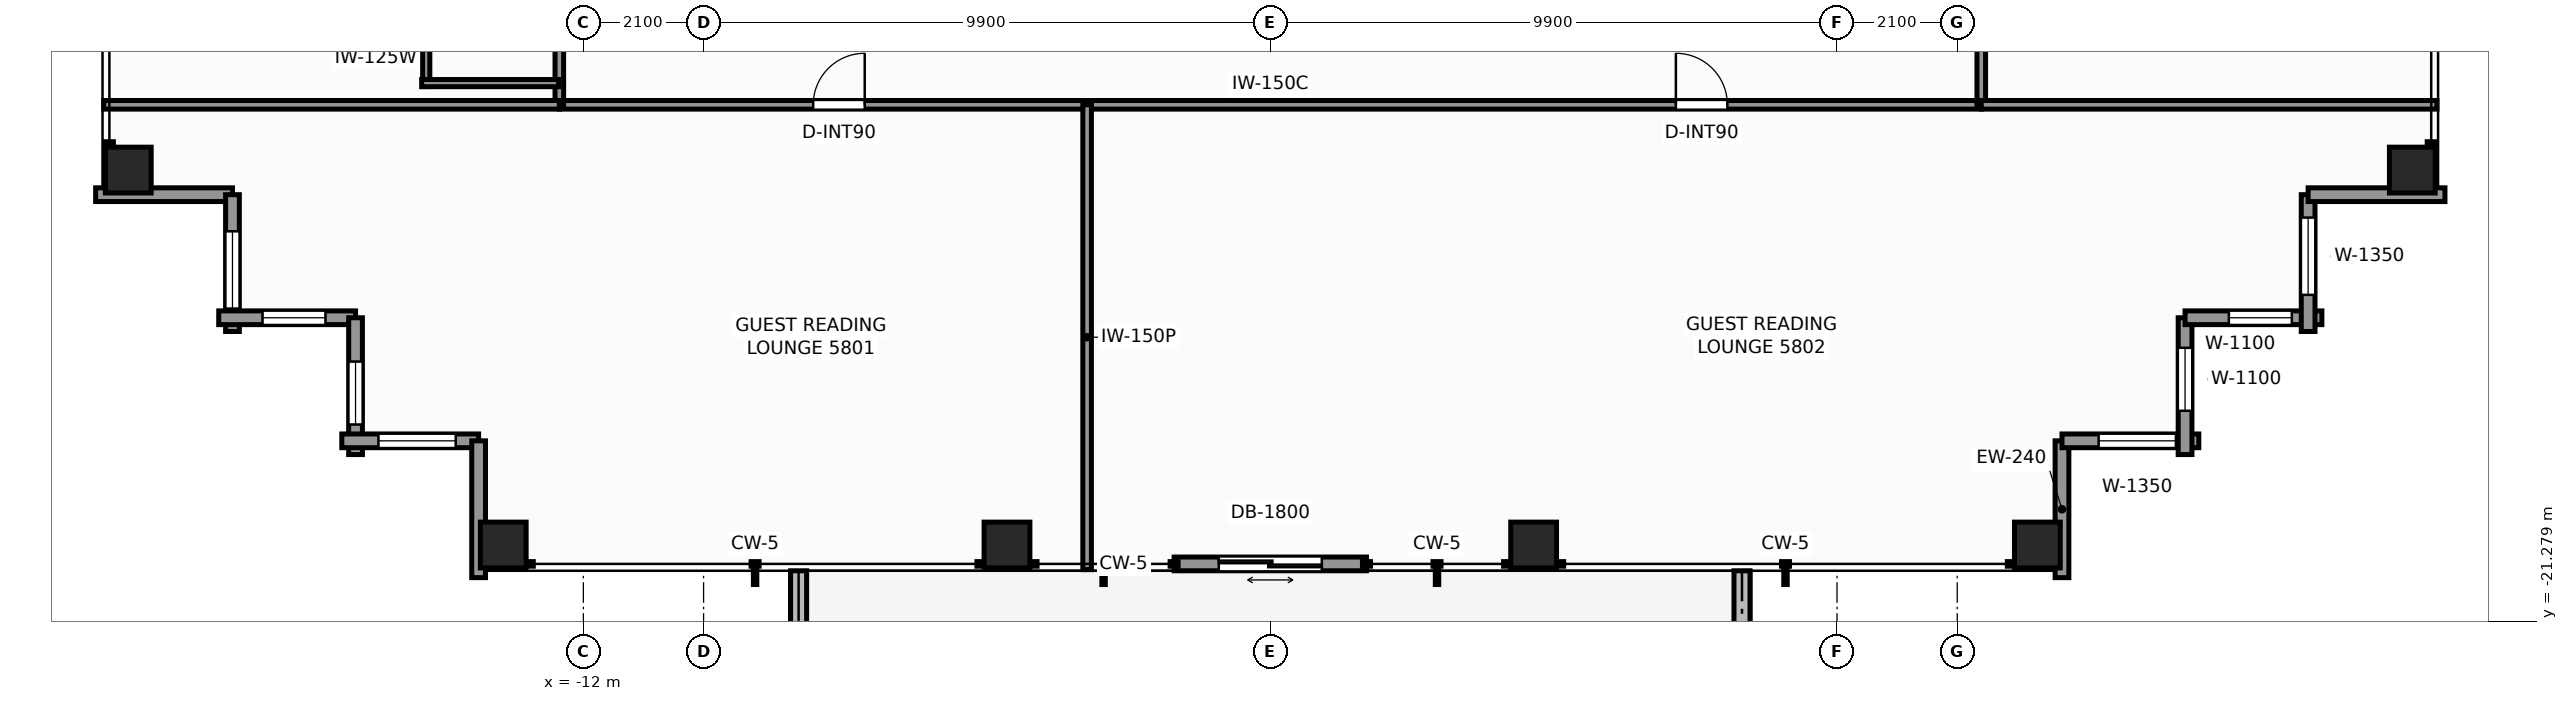
"""IFC4 building model, lengths in metres.
Left out: names, types, materials, properties, quantities, classifications, styles, units other than length and angle.
Written with IfcOpenShell. Run it as: python <this file> out.ifc"""

import sys

from ifc_helpers import new_model, si_unit, direction, frame, frame_2d, origin, origin_2d, place, context, subcontext, project, spatial, rectangle, extrude, element, fill, save


model = new_model("IFC4")
c1 = context("Model", 3, precision=1e-05, world=origin(), true_north=direction((0.0, 1.0)))
c2 = subcontext(c1, "Body", "Model", "MODEL_VIEW")
j1 = project(units=[si_unit("LENGTHUNIT", "METRE"), si_unit("PLANEANGLEUNIT", "RADIAN")], contexts=[c1])
p1 = place(None, origin())
s1 = spatial("IfcSite", under=j1, at=p1, CompositionType="ELEMENT")
p2 = place(p1, origin())
s2 = spatial("IfcBuilding", under=s1, at=p2, CompositionType="ELEMENT")
p3 = place(p2, frame((0.0, 0.0, 199.8)))
s3 = spatial("IfcBuildingStorey", under=s2, at=p3, CompositionType="ELEMENT", Elevation=199.8)
for number, where, z_axis, x_axis in (
    (1, (-13.4, -19.95, 0.0), (0.0, 0.0, 1.0), (1.0, 0.0, 0.0)),
    (2, (-4.6, -19.95, 0.0), (0.0, 0.0, 1.0), (1.0, 0.0, 0.0)),
    (3, (4.6, -19.95, 0.0), (0.0, 0.0, 1.0), (1.0, 0.0, 0.0)),
    (4, (13.4, -19.95, 0.0), (0.0, 0.0, 1.0), (1.0, 0.0, 0.0)),
    (5, (-19.95, -13.4, 0.0), (0.0, 0.0, 1.0), (1.0, 0.0, 0.0)),
    (6, (19.95, -13.4, 0.0), (0.0, 0.0, 1.0), (1.0, 0.0, 0.0)),
):
    element("IfcColumn", number, at=place(p3, frame(where, z_axis=z_axis, x_axis=x_axis)), inside=s3, PredefinedType="COLUMN", context=c2, shape_type="SweptSolid", body=[
        extrude(rectangle(XDim=0.8, YDim=0.8, at=origin_2d()), origin(), (0.0, 0.0, 1.0), 3.3),
    ])
p4 = place(p3, frame((8.24, -23.82, -0.04), z_axis=(0.0, 0.0, 1.0), x_axis=(0.0, 1.0, 0.0)))
e7 = element("IfcWall", 7, at=p4, inside=s3, PredefinedType="PARAPET", context=c2, shape_type="SweptSolid", body=[
    extrude(rectangle(XDim=3.42, YDim=0.28, at=frame_2d((1.71, 0.0))), origin(), (0.0, 0.0, 1.0), 0.42),
])
p5 = place(p3, frame((-8.24, -20.4, -0.04), z_axis=(0.0, 0.0, 1.0), x_axis=(0.0, -1.0, 0.0)))
e8 = element("IfcWall", 8, at=p5, inside=s3, PredefinedType="PARAPET", context=c2, shape_type="SweptSolid", body=[
    extrude(rectangle(XDim=2.674, YDim=0.28, at=frame_2d((1.337, 0.0))), origin(), (0.0, 0.0, 1.0), 0.42),
])
p6 = place(p3, frame((1.68, -20.28, 0.0), z_axis=(0.0, 0.0, 1.0), x_axis=(-1.0, 0.0, 0.0)))
e9 = element("IfcWall", 9, at=p6, inside=s3, PredefinedType="STANDARD", context=c2, shape_type="SweptSolid", body=[
    extrude(rectangle(XDim=3.36, YDim=0.24, at=frame_2d((1.68, 0.0))), origin(), (0.0, 0.0, 1.0), 3.08),
])
p7 = place(p6, frame((0.78, 0.0, 0.0)))
e10 = element("IfcOpeningElement", 10, at=p7, cuts=e9, PredefinedType="OPENING", context=c2, shape_type="SweptSolid", body=[
    extrude(rectangle(XDim=1.8, YDim=2.2, at=frame_2d((0.9, 1.1))), frame((0.0, 0.13, 0.0), z_axis=(0.0, -1.0, 0.0), x_axis=(1.0, 0.0, 0.0)), (0.0, 0.0, 1.0), 0.26),
])
p8 = place(p3, frame((13.83, -18.13, 0.0), z_axis=(0.0, 0.0, 1.0), x_axis=(0.0, -1.0, 0.0)))
e11 = element("IfcWall", 11, at=p8, inside=s3, PredefinedType="STANDARD", context=c2, shape_type="SweptSolid", body=[
    extrude(rectangle(XDim=2.39, YDim=0.24, at=frame_2d((1.195, 0.0))), origin(), (0.0, 0.0, 1.0), 2.463),
])
p9 = place(p3, frame((16.22, -18.13, 0.0), z_axis=(0.0, 0.0, 1.0), x_axis=(-1.0, 0.0, 0.0)))
e12 = element("IfcWall", 12, at=p9, inside=s3, PredefinedType="STANDARD", context=c2, shape_type="SweptSolid", body=[
    extrude(rectangle(XDim=2.39, YDim=0.24, at=frame_2d((1.195, 0.0))), origin(), (0.0, 0.0, 1.0), 2.463),
])
p10 = place(p9, frame((0.4, 0.0, 0.65)))
e13 = element("IfcOpeningElement", 13, at=p10, cuts=e12, PredefinedType="OPENING", context=c2, shape_type="SweptSolid", body=[
    extrude(rectangle(XDim=1.35, YDim=1.55, at=frame_2d((0.675, 0.775))), frame((0.0, 0.13, 0.0), z_axis=(0.0, -1.0, 0.0), x_axis=(1.0, 0.0, 0.0)), (0.0, 0.0, 1.0), 0.26),
])
p11 = place(p3, frame((15.98, -15.98, 0.0), z_axis=(0.0, 0.0, 1.0), x_axis=(0.0, -1.0, 0.0)))
e14 = element("IfcWall", 14, at=p11, inside=s3, PredefinedType="STANDARD", context=c2, shape_type="SweptSolid", body=[
    extrude(rectangle(XDim=2.39, YDim=0.24, at=frame_2d((1.195, 0.0))), origin(), (0.0, 0.0, 1.0), 2.463),
])
p12 = place(p11, frame((0.525, 0.0, 0.65)))
e15 = element("IfcOpeningElement", 15, at=p12, cuts=e14, PredefinedType="OPENING", context=c2, shape_type="SweptSolid", body=[
    extrude(rectangle(XDim=1.1, YDim=1.45, at=frame_2d((0.55, 0.725))), frame((0.0, 0.13, 0.0), z_axis=(0.0, -1.0, 0.0), x_axis=(1.0, 0.0, 0.0)), (0.0, 0.0, 1.0), 0.26),
])
p13 = place(p3, frame((18.37, -15.98, 0.0), z_axis=(0.0, 0.0, 1.0), x_axis=(-1.0, 0.0, 0.0)))
e16 = element("IfcWall", 16, at=p13, inside=s3, PredefinedType="STANDARD", context=c2, shape_type="SweptSolid", body=[
    extrude(rectangle(XDim=2.39, YDim=0.24, at=frame_2d((1.195, 0.0))), origin(), (0.0, 0.0, 1.0), 2.463),
])
p14 = place(p13, frame((0.525, 0.0, 0.65)))
e17 = element("IfcOpeningElement", 17, at=p14, cuts=e16, PredefinedType="OPENING", context=c2, shape_type="SweptSolid", body=[
    extrude(rectangle(XDim=1.1, YDim=1.45, at=frame_2d((0.55, 0.725))), frame((0.0, 0.13, 0.0), z_axis=(0.0, -1.0, 0.0), x_axis=(1.0, 0.0, 0.0)), (0.0, 0.0, 1.0), 0.26),
])
p15 = place(p3, frame((18.13, -13.83, 0.0), z_axis=(0.0, 0.0, 1.0), x_axis=(0.0, -1.0, 0.0)))
e18 = element("IfcWall", 18, at=p15, inside=s3, PredefinedType="STANDARD", context=c2, shape_type="SweptSolid", body=[
    extrude(rectangle(XDim=2.39, YDim=0.24, at=frame_2d((1.195, 0.0))), origin(), (0.0, 0.0, 1.0), 2.463),
])
p16 = place(p15, frame((0.4, 0.0, 0.65)))
e19 = element("IfcOpeningElement", 19, at=p16, cuts=e18, PredefinedType="OPENING", context=c2, shape_type="SweptSolid", body=[
    extrude(rectangle(XDim=1.35, YDim=1.55, at=frame_2d((0.675, 0.775))), frame((0.0, 0.13, 0.0), z_axis=(0.0, -1.0, 0.0), x_axis=(1.0, 0.0, 0.0)), (0.0, 0.0, 1.0), 0.26),
])
for number, where, z_axis, x_axis in (
    (20, (20.52, -13.83, 0.0), (0.0, 0.0, 1.0), (-1.0, 0.0, 0.0)),
    (21, (-18.13, -13.83, 0.0), (0.0, 0.0, 1.0), (-1.0, 0.0, 0.0)),
):
    element("IfcWall", number, at=place(p3, frame(where, z_axis=z_axis, x_axis=x_axis)), inside=s3, PredefinedType="STANDARD", context=c2, shape_type="SweptSolid", body=[
        extrude(rectangle(XDim=2.39, YDim=0.24, at=frame_2d((1.195, 0.0))), origin(), (0.0, 0.0, 1.0), 2.463),
    ])
p17 = place(p3, frame((-18.13, -16.22, 0.0), z_axis=(0.0, 0.0, 1.0), x_axis=(0.0, 1.0, 0.0)))
e22 = element("IfcWall", 22, at=p17, inside=s3, PredefinedType="STANDARD", context=c2, shape_type="SweptSolid", body=[
    extrude(rectangle(XDim=2.39, YDim=0.24, at=frame_2d((1.195, 0.0))), origin(), (0.0, 0.0, 1.0), 2.463),
])
p18 = place(p17, frame((0.4, 0.0, 0.65)))
e23 = element("IfcOpeningElement", 23, at=p18, cuts=e22, PredefinedType="OPENING", context=c2, shape_type="SweptSolid", body=[
    extrude(rectangle(XDim=1.35, YDim=1.55, at=frame_2d((0.675, 0.775))), frame((0.0, 0.13, 0.0), z_axis=(0.0, -1.0, 0.0), x_axis=(1.0, 0.0, 0.0)), (0.0, 0.0, 1.0), 0.26),
])
p19 = place(p3, frame((-15.98, -15.98, 0.0), z_axis=(0.0, 0.0, 1.0), x_axis=(-1.0, 0.0, 0.0)))
e24 = element("IfcWall", 24, at=p19, inside=s3, PredefinedType="STANDARD", context=c2, shape_type="SweptSolid", body=[
    extrude(rectangle(XDim=2.39, YDim=0.24, at=frame_2d((1.195, 0.0))), origin(), (0.0, 0.0, 1.0), 2.463),
])
p20 = place(p19, frame((0.525, 0.0, 0.65)))
e25 = element("IfcOpeningElement", 25, at=p20, cuts=e24, PredefinedType="OPENING", context=c2, shape_type="SweptSolid", body=[
    extrude(rectangle(XDim=1.1, YDim=1.45, at=frame_2d((0.55, 0.725))), frame((0.0, 0.13, 0.0), z_axis=(0.0, -1.0, 0.0), x_axis=(1.0, 0.0, 0.0)), (0.0, 0.0, 1.0), 0.26),
])
p21 = place(p3, frame((-15.98, -18.37, 0.0), z_axis=(0.0, 0.0, 1.0), x_axis=(0.0, 1.0, 0.0)))
e26 = element("IfcWall", 26, at=p21, inside=s3, PredefinedType="STANDARD", context=c2, shape_type="SweptSolid", body=[
    extrude(rectangle(XDim=2.39, YDim=0.24, at=frame_2d((1.195, 0.0))), origin(), (0.0, 0.0, 1.0), 2.463),
])
p22 = place(p21, frame((0.525, 0.0, 0.65)))
e27 = element("IfcOpeningElement", 27, at=p22, cuts=e26, PredefinedType="OPENING", context=c2, shape_type="SweptSolid", body=[
    extrude(rectangle(XDim=1.1, YDim=1.45, at=frame_2d((0.55, 0.725))), frame((0.0, 0.13, 0.0), z_axis=(0.0, -1.0, 0.0), x_axis=(1.0, 0.0, 0.0)), (0.0, 0.0, 1.0), 0.26),
])
p23 = place(p3, frame((-13.83, -18.13, 0.0), z_axis=(0.0, 0.0, 1.0), x_axis=(-1.0, 0.0, 0.0)))
e28 = element("IfcWall", 28, at=p23, inside=s3, PredefinedType="STANDARD", context=c2, shape_type="SweptSolid", body=[
    extrude(rectangle(XDim=2.39, YDim=0.24, at=frame_2d((1.195, 0.0))), origin(), (0.0, 0.0, 1.0), 2.463),
])
p24 = place(p23, frame((0.4, 0.0, 0.65)))
e29 = element("IfcOpeningElement", 29, at=p24, cuts=e28, PredefinedType="OPENING", context=c2, shape_type="SweptSolid", body=[
    extrude(rectangle(XDim=1.35, YDim=1.55, at=frame_2d((0.675, 0.775))), frame((0.0, 0.13, 0.0), z_axis=(0.0, -1.0, 0.0), x_axis=(1.0, 0.0, 0.0)), (0.0, 0.0, 1.0), 0.26),
])
p25 = place(p3, frame((-13.83, -20.52, 0.0), z_axis=(0.0, 0.0, 1.0), x_axis=(0.0, 1.0, 0.0)))
e30 = element("IfcWall", 30, at=p25, inside=s3, PredefinedType="STANDARD", context=c2, shape_type="SweptSolid", body=[
    extrude(rectangle(XDim=2.39, YDim=0.24, at=frame_2d((1.195, 0.0))), origin(), (0.0, 0.0, 1.0), 2.463),
])
p26 = place(p3, frame((-12.42, -12.26, 0.0), z_axis=(0.0, 0.0, 1.0), x_axis=(1.0, 0.0, 0.0)))
e31 = element("IfcWall", 31, at=p26, inside=s3, PredefinedType="PARTITIONING", context=c2, shape_type="SweptSolid", body=[
    extrude(rectangle(XDim=24.84, YDim=0.15, at=frame_2d((12.42, 0.0))), origin(), (0.0, 0.0, 1.0), 2.369),
])
p27 = place(p26, frame((4.435, 0.0, 0.0)))
e32 = element("IfcOpeningElement", 32, at=p27, cuts=e31, PredefinedType="OPENING", context=c2, shape_type="SweptSolid", body=[
    extrude(rectangle(XDim=0.9, YDim=2.06, at=frame_2d((0.45, 1.03))), frame((0.0, 0.085, 0.0), z_axis=(0.0, -1.0, 0.0), x_axis=(1.0, 0.0, 0.0)), (0.0, 0.0, 1.0), 0.17),
])
p28 = place(p26, frame((19.505, 0.0, 0.0)))
e33 = element("IfcOpeningElement", 33, at=p28, cuts=e31, PredefinedType="OPENING", context=c2, shape_type="SweptSolid", body=[
    extrude(rectangle(XDim=0.9, YDim=2.06, at=frame_2d((0.45, 1.03))), frame((0.0, 0.085, 0.0), z_axis=(0.0, -1.0, 0.0), x_axis=(1.0, 0.0, 0.0)), (0.0, 0.0, 1.0), 0.17),
])
p29 = place(p3, frame((-12.42, -12.26, 0.0), z_axis=(0.0, 0.0, 1.0), x_axis=(0.0, 1.0, 0.0)))
e34 = element("IfcWall", 34, at=p29, inside=s3, PredefinedType="PARTITIONING", context=c2, shape_type="SweptSolid", body=[
    extrude(rectangle(XDim=24.84, YDim=0.15, at=frame_2d((12.42, 0.0))), origin(), (0.0, 0.0, 1.0), 2.369),
])
p30 = place(p29, frame((3.573, 0.0, 0.0)))
e35 = element("IfcOpeningElement", 35, at=p30, cuts=e34, PredefinedType="OPENING", context=c2, shape_type="SweptSolid", body=[
    extrude(rectangle(XDim=0.95, YDim=2.06, at=frame_2d((0.475, 1.03))), frame((0.0, 0.085, 0.0), z_axis=(0.0, -1.0, 0.0), x_axis=(1.0, 0.0, 0.0)), (0.0, 0.0, 1.0), 0.17),
])
p31 = place(p29, frame((9.755, 0.0, 0.0)))
e36 = element("IfcOpeningElement", 36, at=p31, cuts=e34, PredefinedType="OPENING", context=c2, shape_type="SweptSolid", body=[
    extrude(rectangle(XDim=0.95, YDim=2.06, at=frame_2d((0.475, 1.03))), frame((0.0, 0.085, 0.0), z_axis=(0.0, -1.0, 0.0), x_axis=(1.0, 0.0, 0.0)), (0.0, 0.0, 1.0), 0.17),
])
p32 = place(p29, frame((19.32, 0.0, 0.0)))
e37 = element("IfcOpeningElement", 37, at=p32, cuts=e34, PredefinedType="OPENING", context=c2, shape_type="SweptSolid", body=[
    extrude(rectangle(XDim=0.95, YDim=2.06, at=frame_2d((0.475, 1.03))), frame((0.0, 0.085, 0.0), z_axis=(0.0, -1.0, 0.0), x_axis=(1.0, 0.0, 0.0)), (0.0, 0.0, 1.0), 0.17),
])
p33 = place(p3, frame((12.42, -12.26, 0.0), z_axis=(0.0, 0.0, 1.0), x_axis=(0.0, 1.0, 0.0)))
e38 = element("IfcWall", 38, at=p33, inside=s3, PredefinedType="PARTITIONING", context=c2, shape_type="SweptSolid", body=[
    extrude(rectangle(XDim=24.84, YDim=0.15, at=frame_2d((12.42, 0.0))), origin(), (0.0, 0.0, 1.0), 2.369),
])
p34 = place(p33, frame((2.944, 0.0, 0.0)))
e39 = element("IfcOpeningElement", 39, at=p34, cuts=e38, PredefinedType="OPENING", context=c2, shape_type="SweptSolid", body=[
    extrude(rectangle(XDim=0.9, YDim=2.06, at=frame_2d((0.45, 1.03))), frame((0.0, 0.085, 0.0), z_axis=(0.0, -1.0, 0.0), x_axis=(1.0, 0.0, 0.0)), (0.0, 0.0, 1.0), 0.17),
])
p35 = place(p33, frame((5.279, 0.0, 0.0)))
e40 = element("IfcOpeningElement", 40, at=p35, cuts=e38, PredefinedType="OPENING", context=c2, shape_type="SweptSolid", body=[
    extrude(rectangle(XDim=0.9, YDim=2.06, at=frame_2d((0.45, 1.03))), frame((0.0, 0.085, 0.0), z_axis=(0.0, -1.0, 0.0), x_axis=(1.0, 0.0, 0.0)), (0.0, 0.0, 1.0), 0.17),
])
p36 = place(p33, frame((13.602, 0.0, 0.0)))
e41 = element("IfcOpeningElement", 41, at=p36, cuts=e38, PredefinedType="OPENING", context=c2, shape_type="SweptSolid", body=[
    extrude(rectangle(XDim=0.9, YDim=2.06, at=frame_2d((0.45, 1.03))), frame((0.0, 0.085, 0.0), z_axis=(0.0, -1.0, 0.0), x_axis=(1.0, 0.0, 0.0)), (0.0, 0.0, 1.0), 0.17),
])
p37 = place(p33, frame((19.098, 0.0, 0.0)))
e42 = element("IfcOpeningElement", 42, at=p37, cuts=e38, PredefinedType="OPENING", context=c2, shape_type="SweptSolid", body=[
    extrude(rectangle(XDim=0.95, YDim=2.06, at=frame_2d((0.475, 1.03))), frame((0.0, 0.085, 0.0), z_axis=(0.0, -1.0, 0.0), x_axis=(1.0, 0.0, 0.0)), (0.0, 0.0, 1.0), 0.17),
])
p38 = place(p33, frame((20.836, 0.0, 0.0)))
e43 = element("IfcOpeningElement", 43, at=p38, cuts=e38, PredefinedType="OPENING", context=c2, shape_type="SweptSolid", body=[
    extrude(rectangle(XDim=0.9, YDim=2.06, at=frame_2d((0.45, 1.03))), frame((0.0, 0.085, 0.0), z_axis=(0.0, -1.0, 0.0), x_axis=(1.0, 0.0, 0.0)), (0.0, 0.0, 1.0), 0.17),
])
for number, where, z_axis, x_axis in (
    (44, (-20.38, -12.26, 0.0), (0.0, 0.0, 1.0), (1.0, 0.0, 0.0)),
    (45, (12.42, -12.26, 0.0), (0.0, 0.0, 1.0), (1.0, 0.0, 0.0)),
):
    element("IfcWall", number, at=place(p3, frame(where, z_axis=z_axis, x_axis=x_axis)), inside=s3, PredefinedType="PARTITIONING", context=c2, shape_type="SweptSolid", body=[
        extrude(rectangle(XDim=7.96, YDim=0.15, at=frame_2d((3.98, 0.0))), origin(), (0.0, 0.0, 1.0), 2.369),
    ])
p39 = place(p3, frame((-3.2, -20.38, 0.0), z_axis=(0.0, 0.0, 1.0), x_axis=(0.0, 1.0, 0.0)))
e46 = element("IfcWall", 46, at=p39, inside=s3, PredefinedType="PARTITIONING", context=c2, shape_type="SweptSolid", body=[
    extrude(rectangle(XDim=8.12, YDim=0.15, at=frame_2d((4.06, 0.0))), origin(), (0.0, 0.0, 1.0), 2.453),
])
p40 = place(p3, frame((-14.745, -11.941, 0.0), z_axis=(0.0, 0.0, 1.0), x_axis=(0.0, 1.0, 0.0)))
e47 = element("IfcWall", 47, at=p40, inside=s3, PredefinedType="PARTITIONING", context=c2, shape_type="SweptSolid", body=[
    extrude(rectangle(XDim=2.77, YDim=0.125, at=frame_2d((1.385, 0.0))), origin(), (0.0, 0.0, 1.0), 2.369),
])
p41 = place(p3, frame((-14.825, -11.881, 0.0), z_axis=(0.0, 0.0, 1.0), x_axis=(1.0, 0.0, 0.0)))
e48 = element("IfcWall", 48, at=p41, inside=s3, PredefinedType="PARTITIONING", context=c2, shape_type="SweptSolid", body=[
    extrude(rectangle(XDim=2.39, YDim=0.125, at=frame_2d((1.195, 0.0))), origin(), (0.0, 0.0, 1.0), 3.08),
])
p42 = place(p7, origin())
e49 = element("IfcDoor", 49, at=p42, inside=s3, OperationType="DOUBLE_DOOR_SLIDING", PredefinedType="DOOR", context=c2, shape_type="SweptSolid", body=[
    extrude(rectangle(XDim=1.8, YDim=2.2, at=frame_2d((0.9, 1.1))), frame((0.0, 0.025, 0.0), z_axis=(0.0, -1.0, 0.0), x_axis=(1.0, 0.0, 0.0)), (0.0, 0.0, 1.0), 0.05),
])
fill(e10, e49)
p43 = place(p10, origin())
e50 = element("IfcWindow", 50, at=p43, inside=s3, PartitioningType="SINGLE_PANEL", PredefinedType="WINDOW", context=c2, shape_type="SweptSolid", body=[
    extrude(rectangle(XDim=1.35, YDim=1.55, at=frame_2d((0.675, 0.775))), frame((0.0, 0.03, 0.0), z_axis=(0.0, -1.0, 0.0), x_axis=(1.0, 0.0, 0.0)), (0.0, 0.0, 1.0), 0.06),
])
fill(e13, e50)
p44 = place(p12, origin())
e51 = element("IfcWindow", 51, at=p44, inside=s3, PartitioningType="SINGLE_PANEL", PredefinedType="WINDOW", context=c2, shape_type="SweptSolid", body=[
    extrude(rectangle(XDim=1.1, YDim=1.45, at=frame_2d((0.55, 0.725))), frame((0.0, 0.03, 0.0), z_axis=(0.0, -1.0, 0.0), x_axis=(1.0, 0.0, 0.0)), (0.0, 0.0, 1.0), 0.06),
])
fill(e15, e51)
p45 = place(p14, origin())
e52 = element("IfcWindow", 52, at=p45, inside=s3, PartitioningType="SINGLE_PANEL", PredefinedType="WINDOW", context=c2, shape_type="SweptSolid", body=[
    extrude(rectangle(XDim=1.1, YDim=1.45, at=frame_2d((0.55, 0.725))), frame((0.0, 0.03, 0.0), z_axis=(0.0, -1.0, 0.0), x_axis=(1.0, 0.0, 0.0)), (0.0, 0.0, 1.0), 0.06),
])
fill(e17, e52)
p46 = place(p16, origin())
e53 = element("IfcWindow", 53, at=p46, inside=s3, PartitioningType="SINGLE_PANEL", PredefinedType="WINDOW", context=c2, shape_type="SweptSolid", body=[
    extrude(rectangle(XDim=1.35, YDim=1.55, at=frame_2d((0.675, 0.775))), frame((0.0, 0.03, 0.0), z_axis=(0.0, -1.0, 0.0), x_axis=(1.0, 0.0, 0.0)), (0.0, 0.0, 1.0), 0.06),
])
fill(e19, e53)
p47 = place(p18, origin())
e54 = element("IfcWindow", 54, at=p47, inside=s3, PartitioningType="SINGLE_PANEL", PredefinedType="WINDOW", context=c2, shape_type="SweptSolid", body=[
    extrude(rectangle(XDim=1.35, YDim=1.55, at=frame_2d((0.675, 0.775))), frame((0.0, 0.03, 0.0), z_axis=(0.0, -1.0, 0.0), x_axis=(1.0, 0.0, 0.0)), (0.0, 0.0, 1.0), 0.06),
])
fill(e23, e54)
p48 = place(p20, origin())
e55 = element("IfcWindow", 55, at=p48, inside=s3, PartitioningType="SINGLE_PANEL", PredefinedType="WINDOW", context=c2, shape_type="SweptSolid", body=[
    extrude(rectangle(XDim=1.1, YDim=1.45, at=frame_2d((0.55, 0.725))), frame((0.0, 0.03, 0.0), z_axis=(0.0, -1.0, 0.0), x_axis=(1.0, 0.0, 0.0)), (0.0, 0.0, 1.0), 0.06),
])
fill(e25, e55)
p49 = place(p22, origin())
e56 = element("IfcWindow", 56, at=p49, inside=s3, PartitioningType="SINGLE_PANEL", PredefinedType="WINDOW", context=c2, shape_type="SweptSolid", body=[
    extrude(rectangle(XDim=1.1, YDim=1.45, at=frame_2d((0.55, 0.725))), frame((0.0, 0.03, 0.0), z_axis=(0.0, -1.0, 0.0), x_axis=(1.0, 0.0, 0.0)), (0.0, 0.0, 1.0), 0.06),
])
fill(e27, e56)
p50 = place(p24, origin())
e57 = element("IfcWindow", 57, at=p50, inside=s3, PartitioningType="SINGLE_PANEL", PredefinedType="WINDOW", context=c2, shape_type="SweptSolid", body=[
    extrude(rectangle(XDim=1.35, YDim=1.55, at=frame_2d((0.675, 0.775))), frame((0.0, 0.03, 0.0), z_axis=(0.0, -1.0, 0.0), x_axis=(1.0, 0.0, 0.0)), (0.0, 0.0, 1.0), 0.06),
])
fill(e29, e57)
p51 = place(p27, origin())
e58 = element("IfcDoor", 58, at=p51, inside=s3, OperationType="SINGLE_SWING_RIGHT", PredefinedType="DOOR", context=c2, shape_type="SweptSolid", body=[
    extrude(rectangle(XDim=0.9, YDim=2.06, at=frame_2d((0.45, 1.03))), frame((0.0, 0.025, 0.0), z_axis=(0.0, -1.0, 0.0), x_axis=(1.0, 0.0, 0.0)), (0.0, 0.0, 1.0), 0.05),
])
fill(e32, e58)
p52 = place(p28, origin())
e59 = element("IfcDoor", 59, at=p52, inside=s3, OperationType="SINGLE_SWING_LEFT", PredefinedType="DOOR", context=c2, shape_type="SweptSolid", body=[
    extrude(rectangle(XDim=0.9, YDim=2.06, at=frame_2d((0.45, 1.03))), frame((0.0, 0.025, 0.0), z_axis=(0.0, -1.0, 0.0), x_axis=(1.0, 0.0, 0.0)), (0.0, 0.0, 1.0), 0.05),
])
fill(e33, e59)
save(model, sys.argv[1])
